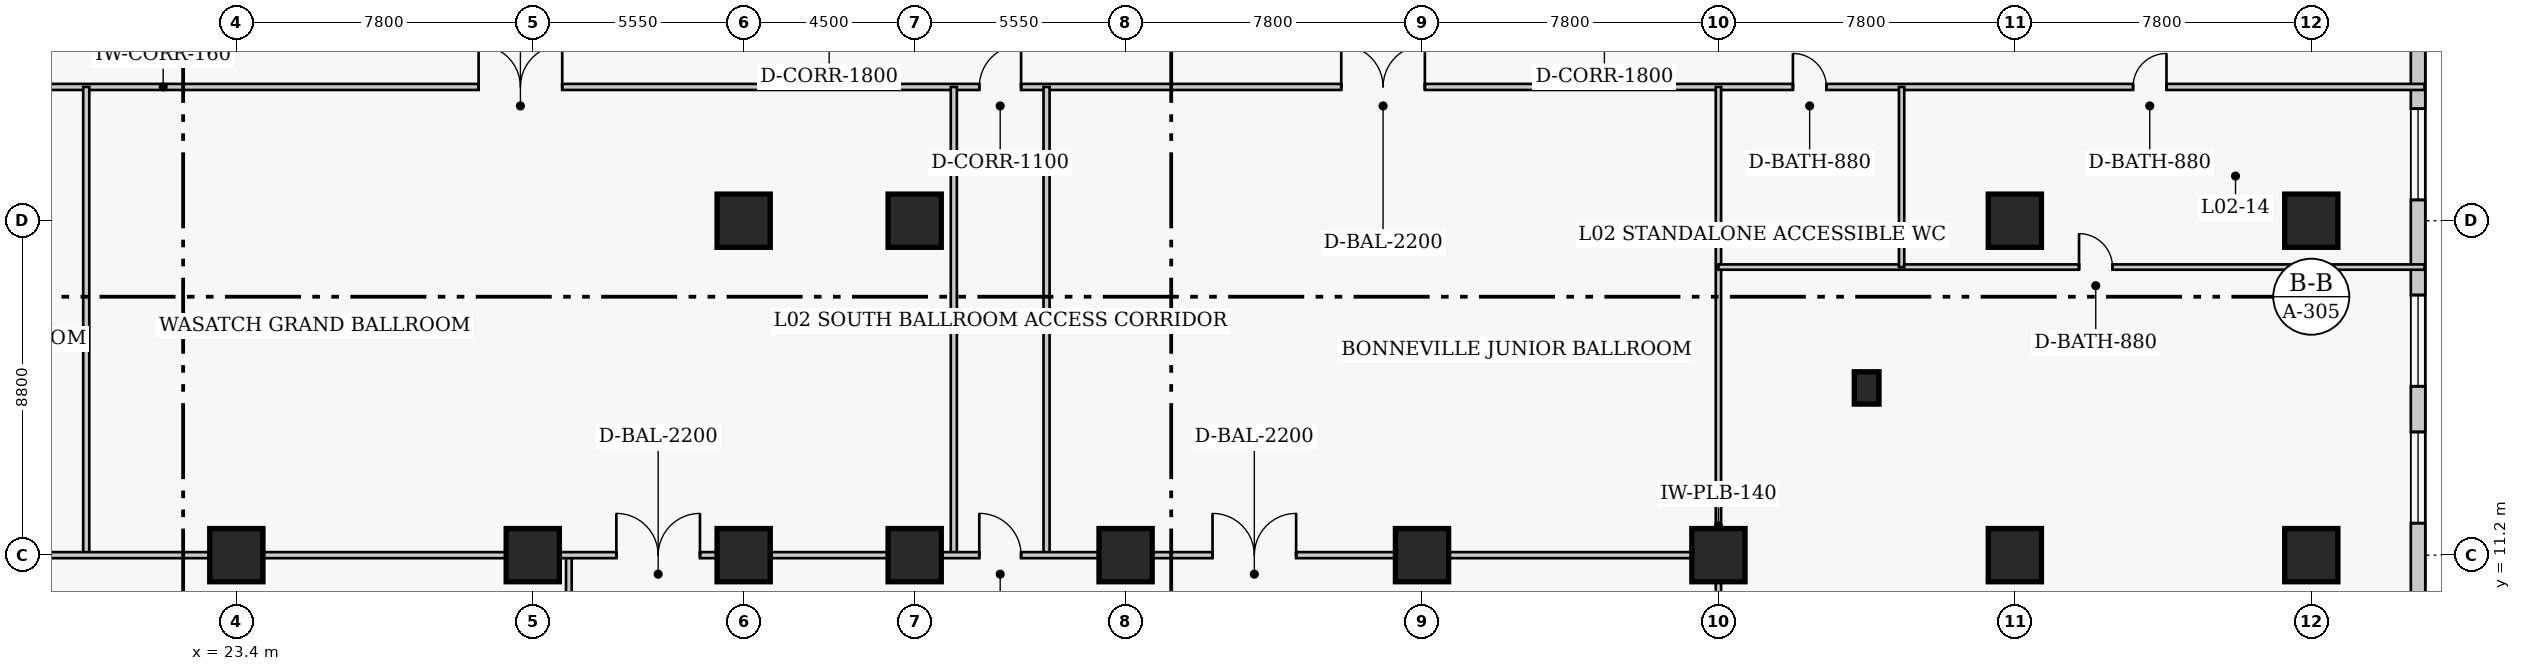
"""IFC4 building model, lengths in metres.
Left out: names, types, materials, properties, quantities, classifications, styles, units other than length and angle.
Written with IfcOpenShell. Run it as: python <this file> out.ifc"""

import sys

from ifc_helpers import new_model, si_unit, direction, frame, frame_2d, origin, origin_2d, place, context, subcontext, project, spatial, rectangle, extrude, element, fill, save


model = new_model("IFC4")
c1 = context("Model", 3, precision=1e-05, world=origin(), true_north=direction((0.0, 1.0)))
c2 = subcontext(c1, "Body", "Model", "MODEL_VIEW")
j1 = project(units=[si_unit("LENGTHUNIT", "METRE"), si_unit("PLANEANGLEUNIT", "RADIAN")], contexts=[c1])
p1 = place(None, origin())
s1 = spatial("IfcSite", under=j1, at=p1, CompositionType="ELEMENT")
p2 = place(p1, origin())
s2 = spatial("IfcBuilding", under=s1, at=p2, CompositionType="ELEMENT")
p3 = place(p2, frame((0.0, 0.0, 10.4)))
s3 = spatial("IfcBuildingStorey", under=s2, at=p3, CompositionType="ELEMENT", Elevation=10.4)
for number, where, z_axis, x_axis in (
    (1, (23.4, 11.2, 0.0), (0.0, 0.0, 1.0), (1.0, 0.0, 0.0)),
    (2, (31.2, 11.2, 0.0), (0.0, 0.0, 1.0), (1.0, 0.0, 0.0)),
    (3, (36.75, 11.2, 0.0), (0.0, 0.0, 1.0), (1.0, 0.0, 0.0)),
    (4, (36.75, 20.0, 0.0), (0.0, 0.0, 1.0), (1.0, 0.0, 0.0)),
    (5, (41.25, 11.2, 0.0), (0.0, 0.0, 1.0), (1.0, 0.0, 0.0)),
    (6, (41.25, 20.0, 0.0), (0.0, 0.0, 1.0), (1.0, 0.0, 0.0)),
    (7, (46.8, 11.2, 0.0), (0.0, 0.0, 1.0), (1.0, 0.0, 0.0)),
    (8, (54.6, 11.2, 0.0), (0.0, 0.0, 1.0), (1.0, 0.0, 0.0)),
    (9, (62.4, 11.2, 0.0), (0.0, 0.0, 1.0), (1.0, 0.0, 0.0)),
    (10, (70.2, 11.2, 0.0), (0.0, 0.0, 1.0), (1.0, 0.0, 0.0)),
    (11, (70.2, 20.0, 0.0), (0.0, 0.0, 1.0), (1.0, 0.0, 0.0)),
    (12, (78.0, 11.2, 0.0), (0.0, 0.0, 1.0), (1.0, 0.0, 0.0)),
    (13, (78.0, 20.0, 0.0), (0.0, 0.0, 1.0), (1.0, 0.0, 0.0)),
):
    element("IfcColumn", number, at=place(p3, frame(where, z_axis=z_axis, x_axis=x_axis)), inside=s3, PredefinedType="COLUMN", context=c2, shape_type="SweptSolid", body=[
        extrude(rectangle(XDim=1.4, YDim=1.4, at=origin_2d()), origin(), (0.0, 0.0, 1.0), 5.4),
    ])
p4 = place(p3, frame((66.3, 15.6, 0.0), z_axis=(0.0, 0.0, 1.0), x_axis=(1.0, 0.0, 0.0)))
e14 = element("IfcColumn", 14, at=p4, inside=s3, PredefinedType="PILASTER", context=c2, shape_type="SweptSolid", body=[
    extrude(rectangle(XDim=0.65, YDim=0.85, at=origin_2d()), origin(), (0.0, 0.0, 1.0), 5.4),
])
p5 = place(p3, frame((80.81, 2.61, 0.0), z_axis=(0.0, 0.0, 1.0), x_axis=(0.0, 1.0, 0.0)))
e15 = element("IfcWall", 15, at=p5, inside=s3, PredefinedType="SOLIDWALL", context=c2, shape_type="SweptSolid", body=[
    extrude(rectangle(XDim=46.78, YDim=0.38, at=frame_2d((23.39, 0.0))), origin(), (0.0, 0.0, 1.0), 5.1),
])
p6 = place(p5, frame((0.927, 0.0, 0.75)))
e16 = element("IfcOpeningElement", 16, at=p6, cuts=e15, PredefinedType="OPENING", context=c2, shape_type="SweptSolid", body=[
    extrude(rectangle(XDim=2.4, YDim=2.2, at=frame_2d((1.2, 1.1))), frame((0.0, 0.2, 0.0), z_axis=(0.0, -1.0, 0.0), x_axis=(1.0, 0.0, 0.0)), (0.0, 0.0, 1.0), 0.4),
])
p7 = place(p5, frame((5.179, 0.0, 0.75)))
e17 = element("IfcOpeningElement", 17, at=p7, cuts=e15, PredefinedType="OPENING", context=c2, shape_type="SweptSolid", body=[
    extrude(rectangle(XDim=2.4, YDim=2.2, at=frame_2d((1.2, 1.1))), frame((0.0, 0.2, 0.0), z_axis=(0.0, -1.0, 0.0), x_axis=(1.0, 0.0, 0.0)), (0.0, 0.0, 1.0), 0.4),
])
p8 = place(p5, frame((9.432, 0.0, 0.75)))
e18 = element("IfcOpeningElement", 18, at=p8, cuts=e15, PredefinedType="OPENING", context=c2, shape_type="SweptSolid", body=[
    extrude(rectangle(XDim=2.4, YDim=2.2, at=frame_2d((1.2, 1.1))), frame((0.0, 0.2, 0.0), z_axis=(0.0, -1.0, 0.0), x_axis=(1.0, 0.0, 0.0)), (0.0, 0.0, 1.0), 0.4),
])
p9 = place(p5, frame((13.034, 0.0, 0.75)))
e19 = element("IfcOpeningElement", 19, at=p9, cuts=e15, PredefinedType="OPENING", context=c2, shape_type="SweptSolid", body=[
    extrude(rectangle(XDim=2.4, YDim=2.2, at=frame_2d((1.2, 1.1))), frame((0.0, 0.2, 0.0), z_axis=(0.0, -1.0, 0.0), x_axis=(1.0, 0.0, 0.0)), (0.0, 0.0, 1.0), 0.4),
])
p10 = place(p5, frame((17.937, 0.0, 0.75)))
e20 = element("IfcOpeningElement", 20, at=p10, cuts=e15, PredefinedType="OPENING", context=c2, shape_type="SweptSolid", body=[
    extrude(rectangle(XDim=2.4, YDim=2.2, at=frame_2d((1.2, 1.1))), frame((0.0, 0.2, 0.0), z_axis=(0.0, -1.0, 0.0), x_axis=(1.0, 0.0, 0.0)), (0.0, 0.0, 1.0), 0.4),
])
p11 = place(p5, frame((26.443, 0.0, 0.75)))
e21 = element("IfcOpeningElement", 21, at=p11, cuts=e15, PredefinedType="OPENING", context=c2, shape_type="SweptSolid", body=[
    extrude(rectangle(XDim=2.4, YDim=2.2, at=frame_2d((1.2, 1.1))), frame((0.0, 0.2, 0.0), z_axis=(0.0, -1.0, 0.0), x_axis=(1.0, 0.0, 0.0)), (0.0, 0.0, 1.0), 0.4),
])
p12 = place(p5, frame((30.696, 0.0, 0.75)))
e22 = element("IfcOpeningElement", 22, at=p12, cuts=e15, PredefinedType="OPENING", context=c2, shape_type="SweptSolid", body=[
    extrude(rectangle(XDim=2.4, YDim=2.2, at=frame_2d((1.2, 1.1))), frame((0.0, 0.2, 0.0), z_axis=(0.0, -1.0, 0.0), x_axis=(1.0, 0.0, 0.0)), (0.0, 0.0, 1.0), 0.4),
])
p13 = place(p5, frame((34.948, 0.0, 0.75)))
e23 = element("IfcOpeningElement", 23, at=p13, cuts=e15, PredefinedType="OPENING", context=c2, shape_type="SweptSolid", body=[
    extrude(rectangle(XDim=2.4, YDim=2.2, at=frame_2d((1.2, 1.1))), frame((0.0, 0.2, 0.0), z_axis=(0.0, -1.0, 0.0), x_axis=(1.0, 0.0, 0.0)), (0.0, 0.0, 1.0), 0.4),
])
p14 = place(p5, frame((39.201, 0.0, 0.75)))
e24 = element("IfcOpeningElement", 24, at=p14, cuts=e15, PredefinedType="OPENING", context=c2, shape_type="SweptSolid", body=[
    extrude(rectangle(XDim=2.4, YDim=2.2, at=frame_2d((1.2, 1.1))), frame((0.0, 0.2, 0.0), z_axis=(0.0, -1.0, 0.0), x_axis=(1.0, 0.0, 0.0)), (0.0, 0.0, 1.0), 0.4),
])
p15 = place(p5, frame((43.454, 0.0, 0.75)))
e25 = element("IfcOpeningElement", 25, at=p15, cuts=e15, PredefinedType="OPENING", context=c2, shape_type="SweptSolid", body=[
    extrude(rectangle(XDim=2.4, YDim=2.2, at=frame_2d((1.2, 1.1))), frame((0.0, 0.2, 0.0), z_axis=(0.0, -1.0, 0.0), x_axis=(1.0, 0.0, 0.0)), (0.0, 0.0, 1.0), 0.4),
])
p16 = place(p3, frame((-2.98, 23.52, 0.0), z_axis=(0.0, 0.0, 1.0), x_axis=(1.0, 0.0, 0.0)))
e26 = element("IfcWall", 26, at=p16, inside=s3, PredefinedType="PARTITIONING", context=c2, shape_type="SweptSolid", body=[
    extrude(rectangle(XDim=83.96, YDim=0.16, at=frame_2d((41.98, 0.0))), origin(), (0.0, 0.0, 1.0), 5.1),
])
p17 = place(p16, frame((7.13, 0.0, 0.0)))
e27 = element("IfcOpeningElement", 27, at=p17, cuts=e26, PredefinedType="OPENING", context=c2, shape_type="SweptSolid", body=[
    extrude(rectangle(XDim=1.0, YDim=2.15, at=frame_2d((0.5, 1.075))), frame((0.0, 0.09, 0.0), z_axis=(0.0, -1.0, 0.0), x_axis=(1.0, 0.0, 0.0)), (0.0, 0.0, 1.0), 0.18),
])
p18 = place(p16, frame((11.96, 0.0, 0.0)))
e28 = element("IfcOpeningElement", 28, at=p18, cuts=e26, PredefinedType="OPENING", context=c2, shape_type="SweptSolid", body=[
    extrude(rectangle(XDim=1.1, YDim=2.15, at=frame_2d((0.55, 1.075))), frame((0.0, 0.09, 0.0), z_axis=(0.0, -1.0, 0.0), x_axis=(1.0, 0.0, 0.0)), (0.0, 0.0, 1.0), 0.18),
])
p19 = place(p16, frame((45.93, 0.0, 0.0)))
e29 = element("IfcOpeningElement", 29, at=p19, cuts=e26, PredefinedType="OPENING", context=c2, shape_type="SweptSolid", body=[
    extrude(rectangle(XDim=1.1, YDim=2.15, at=frame_2d((0.55, 1.075))), frame((0.0, 0.09, 0.0), z_axis=(0.0, -1.0, 0.0), x_axis=(1.0, 0.0, 0.0)), (0.0, 0.0, 1.0), 0.18),
])
p20 = place(p16, frame((15.205, 0.0, 0.0)))
e30 = element("IfcOpeningElement", 30, at=p20, cuts=e26, PredefinedType="OPENING", context=c2, shape_type="SweptSolid", body=[
    extrude(rectangle(XDim=0.95, YDim=2.1, at=frame_2d((0.475, 1.05))), frame((0.0, 0.09, 0.0), z_axis=(0.0, -1.0, 0.0), x_axis=(1.0, 0.0, 0.0)), (0.0, 0.0, 1.0), 0.18),
])
p21 = place(p16, frame((32.755, 0.0, 0.0)))
e31 = element("IfcOpeningElement", 31, at=p21, cuts=e26, PredefinedType="OPENING", context=c2, shape_type="SweptSolid", body=[
    extrude(rectangle(XDim=2.2, YDim=2.4, at=frame_2d((1.1, 1.2))), frame((0.0, 0.09, 0.0), z_axis=(0.0, -1.0, 0.0), x_axis=(1.0, 0.0, 0.0)), (0.0, 0.0, 1.0), 0.18),
])
p22 = place(p16, frame((55.455, 0.0, 0.0)))
e32 = element("IfcOpeningElement", 32, at=p22, cuts=e26, PredefinedType="OPENING", context=c2, shape_type="SweptSolid", body=[
    extrude(rectangle(XDim=2.2, YDim=2.4, at=frame_2d((1.1, 1.2))), frame((0.0, 0.09, 0.0), z_axis=(0.0, -1.0, 0.0), x_axis=(1.0, 0.0, 0.0)), (0.0, 0.0, 1.0), 0.18),
])
p23 = place(p16, frame((67.34, 0.0, 0.0)))
e33 = element("IfcOpeningElement", 33, at=p23, cuts=e26, PredefinedType="OPENING", context=c2, shape_type="SweptSolid", body=[
    extrude(rectangle(XDim=0.88, YDim=2.05, at=frame_2d((0.44, 1.025))), frame((0.0, 0.09, 0.0), z_axis=(0.0, -1.0, 0.0), x_axis=(1.0, 0.0, 0.0)), (0.0, 0.0, 1.0), 0.18),
])
p24 = place(p16, frame((76.29, 0.0, 0.0)))
e34 = element("IfcOpeningElement", 34, at=p24, cuts=e26, PredefinedType="OPENING", context=c2, shape_type="SweptSolid", body=[
    extrude(rectangle(XDim=0.88, YDim=2.05, at=frame_2d((0.44, 1.025))), frame((0.0, 0.09, 0.0), z_axis=(0.0, -1.0, 0.0), x_axis=(1.0, 0.0, 0.0)), (0.0, 0.0, 1.0), 0.18),
])
for number, where, z_axis, x_axis in (
    (35, (19.45, 11.2, 0.0), (0.0, 0.0, 1.0), (0.0, 1.0, 0.0)),
    (36, (42.28, 11.2, 0.0), (0.0, 0.0, 1.0), (0.0, 1.0, 0.0)),
    (37, (44.72, 11.2, 0.0), (0.0, 0.0, 1.0), (0.0, 1.0, 0.0)),
):
    element("IfcWall", number, at=place(p3, frame(where, z_axis=z_axis, x_axis=x_axis)), inside=s3, PredefinedType="PARTITIONING", context=c2, shape_type="SweptSolid", body=[
        extrude(rectangle(XDim=12.32, YDim=0.16, at=frame_2d((6.16, 0.0))), origin(), (0.0, 0.0, 1.0), 5.1),
    ])
p25 = place(p3, frame((32.15, 0.42, 0.0), z_axis=(0.0, 0.0, 1.0), x_axis=(0.0, 1.0, 0.0)))
e38 = element("IfcWall", 38, at=p25, inside=s3, PredefinedType="PARTITIONING", context=c2, shape_type="SweptSolid", body=[
    extrude(rectangle(XDim=10.78, YDim=0.15, at=frame_2d((5.39, 0.0))), origin(), (0.0, 0.0, 1.0), 5.1),
])
p26 = place(p25, frame((1.8, 0.0, 0.0)))
e39 = element("IfcOpeningElement", 39, at=p26, cuts=e38, PredefinedType="OPENING", context=c2, shape_type="SweptSolid", body=[
    extrude(rectangle(XDim=1.1, YDim=2.15, at=frame_2d((0.55, 1.075))), frame((0.0, 0.085, 0.0), z_axis=(0.0, -1.0, 0.0), x_axis=(1.0, 0.0, 0.0)), (0.0, 0.0, 1.0), 0.17),
])
p27 = place(p3, frame((14.4, 11.2, 0.0), z_axis=(0.0, 0.0, 1.0), x_axis=(1.0, 0.0, 0.0)))
e40 = element("IfcWall", 40, at=p27, inside=s3, PredefinedType="PARTITIONING", context=c2, shape_type="SweptSolid", body=[
    extrude(rectangle(XDim=48.0, YDim=0.16, at=frame_2d((24.0, 0.0))), origin(), (0.0, 0.0, 1.0), 4.06),
])
p28 = place(p27, frame((28.55, 0.0, 0.0)))
e41 = element("IfcOpeningElement", 41, at=p28, cuts=e40, PredefinedType="OPENING", context=c2, shape_type="SweptSolid", body=[
    extrude(rectangle(XDim=1.1, YDim=2.15, at=frame_2d((0.55, 1.075))), frame((0.0, 0.09, 0.0), z_axis=(0.0, -1.0, 0.0), x_axis=(1.0, 0.0, 0.0)), (0.0, 0.0, 1.0), 0.18),
])
p29 = place(p27, frame((19.0, 0.0, 0.0)))
e42 = element("IfcOpeningElement", 42, at=p29, cuts=e40, PredefinedType="OPENING", context=c2, shape_type="SweptSolid", body=[
    extrude(rectangle(XDim=2.2, YDim=2.4, at=frame_2d((1.1, 1.2))), frame((0.0, 0.09, 0.0), z_axis=(0.0, -1.0, 0.0), x_axis=(1.0, 0.0, 0.0)), (0.0, 0.0, 1.0), 0.18),
])
p30 = place(p27, frame((34.688, 0.0, 0.0)))
e43 = element("IfcOpeningElement", 43, at=p30, cuts=e40, PredefinedType="OPENING", context=c2, shape_type="SweptSolid", body=[
    extrude(rectangle(XDim=2.2, YDim=2.4, at=frame_2d((1.1, 1.2))), frame((0.0, 0.09, 0.0), z_axis=(0.0, -1.0, 0.0), x_axis=(1.0, 0.0, 0.0)), (0.0, 0.0, 1.0), 0.18),
])
p31 = place(p3, frame((62.4, 0.42, 0.0), z_axis=(0.0, 0.0, 1.0), x_axis=(0.0, 1.0, 0.0)))
e44 = element("IfcWall", 44, at=p31, inside=s3, PredefinedType="PLUMBINGWALL", context=c2, shape_type="SweptSolid", body=[
    extrude(rectangle(XDim=23.1, YDim=0.14, at=frame_2d((11.55, 0.0))), origin(), (0.0, 0.0, 1.0), 4.35),
])
p32 = place(p3, frame((62.4, 18.78, 0.0), z_axis=(0.0, 0.0, 1.0), x_axis=(1.0, 0.0, 0.0)))
e45 = element("IfcWall", 45, at=p32, inside=s3, PredefinedType="PLUMBINGWALL", context=c2, shape_type="SweptSolid", body=[
    extrude(rectangle(XDim=18.58, YDim=0.14, at=frame_2d((9.29, 0.0))), origin(), (0.0, 0.0, 1.0), 5.1),
])
p33 = place(p32, frame((9.489, 0.0, 0.0)))
e46 = element("IfcOpeningElement", 46, at=p33, cuts=e45, PredefinedType="OPENING", context=c2, shape_type="SweptSolid", body=[
    extrude(rectangle(XDim=0.88, YDim=2.05, at=frame_2d((0.44, 1.025))), frame((0.0, 0.08, 0.0), z_axis=(0.0, -1.0, 0.0), x_axis=(1.0, 0.0, 0.0)), (0.0, 0.0, 1.0), 0.16),
])
p34 = place(p3, frame((67.22, 18.78, 0.0), z_axis=(0.0, 0.0, 1.0), x_axis=(0.0, 1.0, 0.0)))
e47 = element("IfcWall", 47, at=p34, inside=s3, PredefinedType="PLUMBINGWALL", context=c2, shape_type="SweptSolid", body=[
    extrude(rectangle(XDim=4.74, YDim=0.14, at=frame_2d((2.37, 0.0))), origin(), (0.0, 0.0, 1.0), 5.1),
])
p35 = place(p8, origin())
e48 = element("IfcWindow", 48, at=p35, inside=s3, PartitioningType="SINGLE_PANEL", PredefinedType="WINDOW", context=c2, shape_type="SweptSolid", body=[
    extrude(rectangle(XDim=2.4, YDim=2.2, at=frame_2d((1.2, 1.1))), frame((0.0, 0.03, 0.0), z_axis=(0.0, -1.0, 0.0), x_axis=(1.0, 0.0, 0.0)), (0.0, 0.0, 1.0), 0.06),
])
fill(e18, e48)
p36 = place(p9, origin())
e49 = element("IfcWindow", 49, at=p36, inside=s3, PartitioningType="SINGLE_PANEL", PredefinedType="WINDOW", context=c2, shape_type="SweptSolid", body=[
    extrude(rectangle(XDim=2.4, YDim=2.2, at=frame_2d((1.2, 1.1))), frame((0.0, 0.03, 0.0), z_axis=(0.0, -1.0, 0.0), x_axis=(1.0, 0.0, 0.0)), (0.0, 0.0, 1.0), 0.06),
])
fill(e19, e49)
p37 = place(p10, origin())
e50 = element("IfcWindow", 50, at=p37, inside=s3, PartitioningType="SINGLE_PANEL", PredefinedType="WINDOW", context=c2, shape_type="SweptSolid", body=[
    extrude(rectangle(XDim=2.4, YDim=2.2, at=frame_2d((1.2, 1.1))), frame((0.0, 0.03, 0.0), z_axis=(0.0, -1.0, 0.0), x_axis=(1.0, 0.0, 0.0)), (0.0, 0.0, 1.0), 0.06),
])
fill(e20, e50)
p38 = place(p19, origin())
e51 = element("IfcDoor", 51, at=p38, inside=s3, OperationType="SINGLE_SWING_RIGHT", PredefinedType="DOOR", context=c2, shape_type="SweptSolid", body=[
    extrude(rectangle(XDim=1.1, YDim=2.15, at=frame_2d((0.55, 1.075))), frame((0.0, 0.025, 0.0), z_axis=(0.0, -1.0, 0.0), x_axis=(1.0, 0.0, 0.0)), (0.0, 0.0, 1.0), 0.05),
])
fill(e29, e51)
p39 = place(p28, origin())
e52 = element("IfcDoor", 52, at=p39, inside=s3, OperationType="SINGLE_SWING_LEFT", PredefinedType="DOOR", context=c2, shape_type="SweptSolid", body=[
    extrude(rectangle(XDim=1.1, YDim=2.15, at=frame_2d((0.55, 1.075))), frame((0.0, 0.025, 0.0), z_axis=(0.0, -1.0, 0.0), x_axis=(1.0, 0.0, 0.0)), (0.0, 0.0, 1.0), 0.05),
])
fill(e41, e52)
p40 = place(p29, origin())
e53 = element("IfcDoor", 53, at=p40, inside=s3, OperationType="DOUBLE_DOOR_SINGLE_SWING", PredefinedType="DOOR", context=c2, shape_type="SweptSolid", body=[
    extrude(rectangle(XDim=2.2, YDim=2.4, at=frame_2d((1.1, 1.2))), frame((0.0, 0.025, 0.0), z_axis=(0.0, -1.0, 0.0), x_axis=(1.0, 0.0, 0.0)), (0.0, 0.0, 1.0), 0.05),
])
fill(e42, e53)
p41 = place(p30, origin())
e54 = element("IfcDoor", 54, at=p41, inside=s3, OperationType="DOUBLE_DOOR_SINGLE_SWING", PredefinedType="DOOR", context=c2, shape_type="SweptSolid", body=[
    extrude(rectangle(XDim=2.2, YDim=2.4, at=frame_2d((1.1, 1.2))), frame((0.0, 0.025, 0.0), z_axis=(0.0, -1.0, 0.0), x_axis=(1.0, 0.0, 0.0)), (0.0, 0.0, 1.0), 0.05),
])
fill(e43, e54)
p42 = place(p21, origin())
e55 = element("IfcDoor", 55, at=p42, inside=s3, OperationType="DOUBLE_DOOR_SINGLE_SWING", PredefinedType="DOOR", context=c2, shape_type="SweptSolid", body=[
    extrude(rectangle(XDim=2.2, YDim=2.4, at=frame_2d((1.1, 1.2))), frame((0.0, 0.025, 0.0), z_axis=(0.0, -1.0, 0.0), x_axis=(1.0, 0.0, 0.0)), (0.0, 0.0, 1.0), 0.05),
])
fill(e31, e55)
p43 = place(p22, origin())
e56 = element("IfcDoor", 56, at=p43, inside=s3, OperationType="DOUBLE_DOOR_SINGLE_SWING", PredefinedType="DOOR", context=c2, shape_type="SweptSolid", body=[
    extrude(rectangle(XDim=2.2, YDim=2.4, at=frame_2d((1.1, 1.2))), frame((0.0, 0.025, 0.0), z_axis=(0.0, -1.0, 0.0), x_axis=(1.0, 0.0, 0.0)), (0.0, 0.0, 1.0), 0.05),
])
fill(e32, e56)
p44 = place(p23, origin())
e57 = element("IfcDoor", 57, at=p44, inside=s3, OperationType="SINGLE_SWING_LEFT", PredefinedType="DOOR", context=c2, shape_type="SweptSolid", body=[
    extrude(rectangle(XDim=0.88, YDim=2.05, at=frame_2d((0.44, 1.025))), frame((0.0, 0.025, 0.0), z_axis=(0.0, -1.0, 0.0), x_axis=(1.0, 0.0, 0.0)), (0.0, 0.0, 1.0), 0.05),
])
fill(e33, e57)
p45 = place(p24, origin())
e58 = element("IfcDoor", 58, at=p45, inside=s3, OperationType="SINGLE_SWING_RIGHT", PredefinedType="DOOR", context=c2, shape_type="SweptSolid", body=[
    extrude(rectangle(XDim=0.88, YDim=2.05, at=frame_2d((0.44, 1.025))), frame((0.0, 0.025, 0.0), z_axis=(0.0, -1.0, 0.0), x_axis=(1.0, 0.0, 0.0)), (0.0, 0.0, 1.0), 0.05),
])
fill(e34, e58)
p46 = place(p33, origin())
e59 = element("IfcDoor", 59, at=p46, inside=s3, OperationType="SINGLE_SWING_LEFT", PredefinedType="DOOR", context=c2, shape_type="SweptSolid", body=[
    extrude(rectangle(XDim=0.88, YDim=2.05, at=frame_2d((0.44, 1.025))), frame((0.0, 0.025, 0.0), z_axis=(0.0, -1.0, 0.0), x_axis=(1.0, 0.0, 0.0)), (0.0, 0.0, 1.0), 0.05),
])
fill(e46, e59)
save(model, sys.argv[1])
